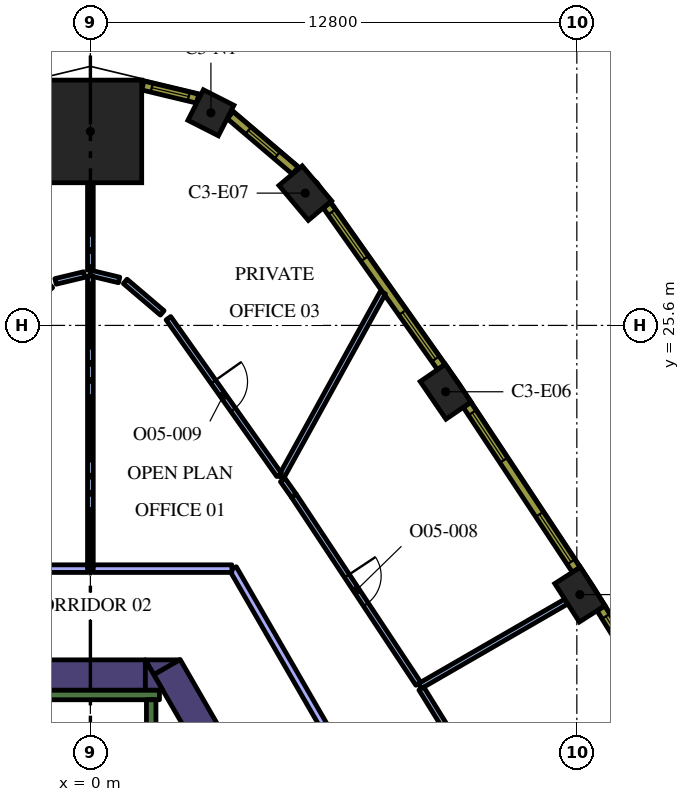
"""IFC4 building model, lengths in metres.
Left out: names, types, materials, properties, quantities, classifications, styles, units other than length and angle.
Written with IfcOpenShell. Run it as: python <this file> out.ifc"""

import sys

from ifc_helpers import new_model, si_unit, direction, frame, frame_2d, origin, origin_2d, place, context, subcontext, project, spatial, polyline, rectangle, outline, extrude, element, fill, save


model = new_model("IFC4")
c1 = context("Model", 3, precision=1e-05, world=origin(), true_north=direction((0.0, 1.0)))
c2 = subcontext(c1, "Body", "Model", "MODEL_VIEW")
j1 = project(units=[si_unit("LENGTHUNIT", "METRE"), si_unit("PLANEANGLEUNIT", "RADIAN")], contexts=[c1])
p1 = place(None, origin())
s1 = spatial("IfcSite", under=j1, at=p1, CompositionType="ELEMENT")
p2 = place(p1, origin())
s2 = spatial("IfcBuilding", under=s1, at=p2, CompositionType="ELEMENT")
p3 = place(p2, frame((0.0, 0.0, 192.0)))
s3 = spatial("IfcBuildingStorey", under=s2, at=p3, CompositionType="ELEMENT", Elevation=192.0)
p4 = place(p3, frame((0.0, 30.704, 0.0), z_axis=(0.0, 0.0, 1.0), x_axis=(0.0, 1.0, 0.0)))
e1 = element("IfcColumn", 1, at=p4, inside=s3, PredefinedType="COLUMN", context=c2, shape_type="SweptSolid", body=[
    extrude(rectangle(XDim=2.7, YDim=2.7, at=origin_2d()), origin(), (0.0, 0.0, 1.0), 4.2),
])
for number, where, z_axis, x_axis in (
    (2, (12.88, 18.517, 0.0), (0.0, 0.0, 1.0), (-0.539, 0.842, 0.0)),
    (3, (9.348, 23.854, 0.0), (0.0, 0.0, 1.0), (-0.565, 0.825, 0.0)),
    (4, (5.654, 29.081, 0.0), (0.0, 0.0, 1.0), (-0.644, 0.765, 0.0)),
):
    element("IfcColumn", number, at=place(p3, frame(where, z_axis=z_axis, x_axis=x_axis)), inside=s3, PredefinedType="COLUMN", context=c2, shape_type="SweptSolid", body=[
        extrude(rectangle(XDim=1.2, YDim=0.8, at=origin_2d()), origin(), (0.0, 0.0, 1.0), 4.2),
    ])
p5 = place(p3, frame((3.171, 31.195, 0.0), z_axis=(0.0, 0.0, 1.0), x_axis=(-0.891486197647, 0.453047855535, 0.0)))
e5 = element("IfcColumn", 5, at=p5, inside=s3, PredefinedType="COLUMN", context=c2, shape_type="SweptSolid", body=[
    extrude(rectangle(XDim=0.9, YDim=0.9, at=origin_2d()), origin(), (0.0, 0.0, 1.0), 4.2),
])
p6 = place(p3, frame((8.279, 5.761, 0.0), z_axis=(0.0, 0.0, 1.0), x_axis=(-0.500010359015, 0.866019422922, 0.0)))
e6 = element("IfcWall", 6, at=p6, inside=s3, PredefinedType="SOLIDWALL", context=c2, shape_type="SweptSolid", body=[
    extrude(rectangle(XDim=12.528, YDim=0.8, at=frame_2d((6.264, 0.0))), origin(), (0.0, 0.0, 1.0), 4.2),
])
p7 = place(p3, origin())
e7 = element("IfcWall", 7, at=p7, inside=s3, PredefinedType="SOLIDWALL", context=c2, shape_type="SweptSolid", body=[
    extrude(outline(polyline([(1.443, 16.8), (2.339, 16.8), (1.667, 16.412), (1.443, 16.8)])), origin(), (0.0, 0.0, 1.0), 4.2),
])
p8 = place(p3, frame((-2.379, 16.4, 0.0), z_axis=(0.0, 0.0, 1.0), x_axis=(1.0, 0.0, 0.0)))
e8 = element("IfcWall", 8, at=p8, inside=s3, PredefinedType="SOLIDWALL", context=c2, shape_type="SweptSolid", body=[
    extrude(rectangle(XDim=3.824, YDim=0.8, at=frame_2d((1.912, 0.0))), origin(), (0.0, 0.0, 1.0), 4.2),
])
e9 = element("IfcWall", 9, at=p7, inside=s3, PredefinedType="SOLIDWALL", context=c2, shape_type="SweptSolid", body=[
    extrude(outline(polyline([(1.905, 16.0), (1.447, 16.0), (1.447, 16.793), (1.905, 16.0)])), origin(), (0.0, 0.0, 1.0), 4.2),
])
p9 = place(p3, frame((-1.817, 15.875, 0.0), z_axis=(0.0, 0.0, 1.0), x_axis=(1.0, 0.0, 0.0)))
e10 = element("IfcWall", 10, at=p9, inside=s3, PredefinedType="SOLIDWALL", context=c2, shape_type="SweptSolid", body=[
    extrude(rectangle(XDim=3.634, YDim=0.25, at=frame_2d((1.817, 0.0))), origin(), (0.0, 0.0, 1.0), 4.2),
])
p10 = place(p3, frame((1.6, 8.95, 0.0), z_axis=(0.0, 0.0, 1.0), x_axis=(0.0, 1.0, 0.0)))
e11 = element("IfcWall", 11, at=p10, inside=s3, PredefinedType="SOLIDWALL", context=c2, shape_type="SweptSolid", body=[
    extrude(rectangle(XDim=6.8, YDim=0.25, at=frame_2d((3.4, 0.0))), origin(), (0.0, 0.0, 1.0), 4.2),
])
p11 = place(p3, frame((8.669, 16.11, 0.0), z_axis=(0.0, 0.0, 1.0), x_axis=(0.866019272134, 0.50001062018, 0.0)))
e12 = element("IfcWall", 12, at=p11, inside=s3, PredefinedType="PARTITIONING", context=c2, shape_type="SweptSolid", body=[
    extrude(rectangle(XDim=4.449, YDim=0.15, at=frame_2d((2.225, 0.0))), origin(), (0.0, 0.0, 1.0), 3.1),
])
p12 = place(p3, frame((8.708, 16.046, 0.0), z_axis=(0.0, 0.0, 1.0), x_axis=(0.527179193015, -0.849754140003, 0.0)))
e13 = element("IfcWall", 13, at=p12, inside=s3, PredefinedType="PARTITIONING", context=c2, shape_type="SweptSolid", body=[
    extrude(rectangle(XDim=6.42, YDim=0.15, at=frame_2d((3.21, 0.0))), origin(), (0.0, 0.0, 1.0), 3.1),
])
p13 = place(p12, frame((2.719, 0.0, 0.0)))
e14 = element("IfcOpeningElement", 14, at=p13, cuts=e13, PredefinedType="OPENING", context=c2, shape_type="SweptSolid", body=[
    extrude(rectangle(XDim=0.9, YDim=2.1, at=frame_2d((0.45, 1.05))), frame((0.0, 0.085, 0.0), z_axis=(0.0, -1.0, 0.0), x_axis=(1.0, 0.0, 0.0)), (0.0, 0.0, 1.0), 0.17),
])
p14 = place(p3, frame((5.014, 21.599, 0.0), z_axis=(0.0, 0.0, 1.0), x_axis=(0.483014624036, 0.875612284614, 0.0)))
e15 = element("IfcWall", 15, at=p14, inside=s3, PredefinedType="PARTITIONING", context=c2, shape_type="SweptSolid", body=[
    extrude(rectangle(XDim=5.557, YDim=0.15, at=frame_2d((2.778, 0.0))), origin(), (0.0, 0.0, 1.0), 3.1),
])
p15 = place(p3, frame((5.352, 21.121, 0.0), z_axis=(0.0, 0.0, 1.0), x_axis=(0.551896352686, -0.833912714792, 0.0)))
e16 = element("IfcWall", 16, at=p15, inside=s3, PredefinedType="PARTITIONING", context=c2, shape_type="SweptSolid", body=[
    extrude(rectangle(XDim=5.934, YDim=0.15, at=frame_2d((2.967, 0.0))), origin(), (0.0, 0.0, 1.0), 3.1),
])
p16 = place(p15, frame((2.534, 0.0, 0.0)))
e17 = element("IfcOpeningElement", 17, at=p16, cuts=e16, PredefinedType="OPENING", context=c2, shape_type="SweptSolid", body=[
    extrude(rectangle(XDim=0.9, YDim=2.1, at=frame_2d((0.45, 1.05))), frame((0.0, 0.085, 0.0), z_axis=(0.0, -1.0, 0.0), x_axis=(1.0, 0.0, 0.0)), (0.0, 0.0, 1.0), 0.17),
])
p17 = place(p3, frame((5.352, 21.121, 0.0), z_axis=(0.0, 0.0, 1.0), x_axis=(-0.57727495493, 0.816549830941, 0.0)))
e18 = element("IfcWall", 18, at=p17, inside=s3, PredefinedType="PARTITIONING", context=c2, shape_type="SweptSolid", body=[
    extrude(rectangle(XDim=0.502, YDim=0.15, at=frame_2d((0.251, 0.0))), origin(), (0.0, 0.0, 1.0), 3.1),
])
p18 = place(p3, frame((2.053, 25.79, 0.0), z_axis=(0.0, 0.0, 1.0), x_axis=(0.5770856814, -0.816683608458, 0.0)))
e19 = element("IfcWall", 19, at=p18, inside=s3, PredefinedType="PARTITIONING", context=c2, shape_type="SweptSolid", body=[
    extrude(rectangle(XDim=5.048, YDim=0.15, at=frame_2d((2.524, 0.0))), origin(), (0.0, 0.0, 1.0), 3.1),
])
p19 = place(p18, frame((2.048, 0.0, 0.0)))
e20 = element("IfcOpeningElement", 20, at=p19, cuts=e19, PredefinedType="OPENING", context=c2, shape_type="SweptSolid", body=[
    extrude(rectangle(XDim=0.9, YDim=2.1, at=frame_2d((0.45, 1.05))), frame((0.0, 0.085, 0.0), z_axis=(0.0, -1.0, 0.0), x_axis=(1.0, 0.0, 0.0)), (0.0, 0.0, 1.0), 0.17),
])
p20 = place(p3, frame((1.89, 25.929, 0.0), z_axis=(0.0, 0.0, 1.0), x_axis=(-0.761368905571, 0.648318895012, 0.0)))
e21 = element("IfcWall", 21, at=p20, inside=s3, PredefinedType="PARTITIONING", context=c2, shape_type="SweptSolid", body=[
    extrude(rectangle(XDim=1.279, YDim=0.15, at=frame_2d((0.639, 0.0))), origin(), (0.0, 0.0, 1.0), 3.1),
])
p21 = place(p3, frame((0.756, 26.796, 0.0), z_axis=(0.0, 0.0, 1.0), x_axis=(-0.972515505601, 0.232838122666, 0.0)))
e22 = element("IfcWall", 22, at=p21, inside=s3, PredefinedType="PARTITIONING", context=c2, shape_type="SweptSolid", body=[
    extrude(rectangle(XDim=0.777, YDim=0.15, at=frame_2d((0.388, 0.0))), origin(), (0.0, 0.0, 1.0), 3.1),
])
p22 = place(p3, frame((0.0, 27.054, 0.0), z_axis=(0.0, 0.0, 1.0), x_axis=(0.0, 1.0, 0.0)))
e23 = element("IfcWall", 23, at=p22, inside=s3, PredefinedType="PARTITIONING", context=c2, shape_type="SweptSolid", body=[
    extrude(rectangle(XDim=2.3, YDim=0.15, at=frame_2d((1.15, 0.0))), origin(), (0.0, 0.0, 1.0), 3.1),
])
p23 = place(p3, frame((0.0, 19.2, 0.0), z_axis=(0.0, 0.0, 1.0), x_axis=(0.0, 1.0, 0.0)))
e24 = element("IfcWall", 24, at=p23, inside=s3, PredefinedType="PARTITIONING", context=c2, shape_type="SweptSolid", body=[
    extrude(rectangle(XDim=7.7, YDim=0.15, at=frame_2d((3.85, 0.0))), origin(), (0.0, 0.0, 1.0), 3.1),
])
p24 = place(p3, frame((8.113, 11.647, 0.0), z_axis=(0.0, 0.0, 1.0), x_axis=(-0.500001933108, 0.866024287701, 0.0)))
e25 = element("IfcWall", 25, at=p24, inside=s3, PredefinedType="PARTITIONING", context=c2, shape_type="SweptSolid", body=[
    extrude(rectangle(XDim=8.721, YDim=0.2, at=frame_2d((4.361, 0.0))), origin(), (0.0, 0.0, 1.0), 3.1),
])
p25 = place(p3, frame((3.723, 19.2, 0.0), z_axis=(0.0, 0.0, 1.0), x_axis=(-1.0, 0.0, 0.0)))
e26 = element("IfcWall", 26, at=p25, inside=s3, PredefinedType="PARTITIONING", context=c2, shape_type="SweptSolid", body=[
    extrude(rectangle(XDim=3.648, YDim=0.2, at=frame_2d((1.824, 0.0))), origin(), (0.0, 0.0, 1.0), 3.1),
])
p26 = place(p3, frame((-0.161, 26.939, 0.0), z_axis=(0.0, 0.0, 1.0), x_axis=(-0.972515505601, -0.232838122666, 0.0)))
e27 = element("IfcWall", 27, at=p26, inside=s3, PredefinedType="PARTITIONING", context=c2, shape_type="SweptSolid", body=[
    extrude(rectangle(XDim=0.777, YDim=0.15, at=frame_2d((0.388, 0.0))), origin(), (0.0, 0.0, 1.0), 3.1),
])
p27 = place(p3, frame((-1.042, 26.65, 0.0), z_axis=(0.0, 0.0, 1.0), x_axis=(-0.761485303115, -0.648182175888, 0.0)))
e28 = element("IfcWall", 28, at=p27, inside=s3, PredefinedType="PARTITIONING", context=c2, shape_type="SweptSolid", body=[
    extrude(rectangle(XDim=1.327, YDim=0.15, at=frame_2d((0.664, 0.0))), origin(), (0.0, 0.0, 1.0), 3.1),
])
p28 = place(p3, frame((-0.075, 19.2, 0.0), z_axis=(0.0, 0.0, 1.0), x_axis=(-1.0, 0.0, 0.0)))
e29 = element("IfcWall", 29, at=p28, inside=s3, PredefinedType="PARTITIONING", context=c2, shape_type="SweptSolid", body=[
    extrude(rectangle(XDim=3.678, YDim=0.2, at=frame_2d((1.839, 0.0))), origin(), (0.0, 0.0, 1.0), 3.1),
])
p29 = place(p3, frame((16.171, 13.731, 0.0), z_axis=(0.0, 0.0, 1.0), x_axis=(-0.526197926587, 0.850362124072, 0.0)))
e30 = element("IfcWall", 30, at=p29, inside=s3, PredefinedType="SOLIDWALL", context=c2, shape_type="SweptSolid", body=[
    extrude(rectangle(XDim=5.203, YDim=0.24, at=frame_2d((2.602, 0.0))), origin(), (0.0, 0.0, 1.0), 3.9),
])
p30 = place(p29, frame((0.248, 0.0, 0.9)))
e31 = element("IfcOpeningElement", 31, at=p30, cuts=e30, PredefinedType="OPENING", context=c2, shape_type="SweptSolid", body=[
    extrude(rectangle(XDim=1.5, YDim=2.55, at=frame_2d((0.75, 1.275))), frame((0.0, 0.13, 0.0), z_axis=(0.0, -1.0, 0.0), x_axis=(1.0, 0.0, 0.0)), (0.0, 0.0, 1.0), 0.26),
])
p31 = place(p29, frame((3.455, 0.0, 0.9)))
e32 = element("IfcOpeningElement", 32, at=p31, cuts=e30, PredefinedType="OPENING", context=c2, shape_type="SweptSolid", body=[
    extrude(rectangle(XDim=1.5, YDim=2.55, at=frame_2d((0.75, 1.275))), frame((0.0, 0.13, 0.0), z_axis=(0.0, -1.0, 0.0), x_axis=(1.0, 0.0, 0.0)), (0.0, 0.0, 1.0), 0.26),
])
p32 = place(p3, frame((12.783, 19.171, 0.0), z_axis=(0.0, 0.0, 1.0), x_axis=(-0.551892811511, 0.833915058386, 0.0)))
e33 = element("IfcWall", 33, at=p32, inside=s3, PredefinedType="SOLIDWALL", context=c2, shape_type="SweptSolid", body=[
    extrude(rectangle(XDim=5.204, YDim=0.24, at=frame_2d((2.602, 0.0))), origin(), (0.0, 0.0, 1.0), 3.9),
])
p33 = place(p32, frame((0.248, 0.0, 0.9)))
e34 = element("IfcOpeningElement", 34, at=p33, cuts=e33, PredefinedType="OPENING", context=c2, shape_type="SweptSolid", body=[
    extrude(rectangle(XDim=1.5, YDim=2.55, at=frame_2d((0.75, 1.275))), frame((0.0, 0.13, 0.0), z_axis=(0.0, -1.0, 0.0), x_axis=(1.0, 0.0, 0.0)), (0.0, 0.0, 1.0), 0.26),
])
p34 = place(p32, frame((3.455, 0.0, 0.9)))
e35 = element("IfcOpeningElement", 35, at=p34, cuts=e33, PredefinedType="OPENING", context=c2, shape_type="SweptSolid", body=[
    extrude(rectangle(XDim=1.5, YDim=2.55, at=frame_2d((0.75, 1.275))), frame((0.0, 0.13, 0.0), z_axis=(0.0, -1.0, 0.0), x_axis=(1.0, 0.0, 0.0)), (0.0, 0.0, 1.0), 0.26),
])
p35 = place(p3, frame((9.231, 24.504, 0.0), z_axis=(0.0, 0.0, 1.0), x_axis=(-0.577115207679, 0.816662743772, 0.0)))
e36 = element("IfcWall", 36, at=p35, inside=s3, PredefinedType="SOLIDWALL", context=c2, shape_type="SweptSolid", body=[
    extrude(rectangle(XDim=5.213, YDim=0.24, at=frame_2d((2.606, 0.0))), origin(), (0.0, 0.0, 1.0), 3.9),
])
p36 = place(p35, frame((0.261, 0.0, 0.9)))
e37 = element("IfcOpeningElement", 37, at=p36, cuts=e36, PredefinedType="OPENING", context=c2, shape_type="SweptSolid", body=[
    extrude(rectangle(XDim=1.5, YDim=2.55, at=frame_2d((0.75, 1.275))), frame((0.0, 0.13, 0.0), z_axis=(0.0, -1.0, 0.0), x_axis=(1.0, 0.0, 0.0)), (0.0, 0.0, 1.0), 0.26),
])
p37 = place(p35, frame((3.492, 0.0, 0.9)))
e38 = element("IfcOpeningElement", 38, at=p37, cuts=e36, PredefinedType="OPENING", context=c2, shape_type="SweptSolid", body=[
    extrude(rectangle(XDim=1.5, YDim=2.55, at=frame_2d((0.75, 1.275))), frame((0.0, 0.13, 0.0), z_axis=(0.0, -1.0, 0.0), x_axis=(1.0, 0.0, 0.0)), (0.0, 0.0, 1.0), 0.26),
])
p38 = place(p3, frame((5.392, 29.672, 0.0), z_axis=(0.0, 0.0, 1.0), x_axis=(-0.761419744247, 0.648259186645, 0.0)))
e39 = element("IfcWall", 39, at=p38, inside=s3, PredefinedType="SOLIDWALL", context=c2, shape_type="SweptSolid", body=[
    extrude(rectangle(XDim=2.25, YDim=0.24, at=frame_2d((1.125, 0.0))), origin(), (0.0, 0.0, 1.0), 3.9),
])
p39 = place(p38, frame((0.625, 0.0, 0.9)))
e40 = element("IfcOpeningElement", 40, at=p39, cuts=e39, PredefinedType="OPENING", context=c2, shape_type="SweptSolid", body=[
    extrude(rectangle(XDim=1.0, YDim=2.55, at=frame_2d((0.5, 1.275))), frame((0.0, 0.13, 0.0), z_axis=(0.0, -1.0, 0.0), x_axis=(1.0, 0.0, 0.0)), (0.0, 0.0, 1.0), 0.26),
])
p40 = place(p3, frame((2.821, 31.566, 0.0), z_axis=(0.0, 0.0, 1.0), x_axis=(-0.972479955788, 0.232986556673, 0.0)))
e41 = element("IfcWall", 41, at=p40, inside=s3, PredefinedType="SOLIDWALL", context=c2, shape_type="SweptSolid", body=[
    extrude(rectangle(XDim=1.482, YDim=0.24, at=frame_2d((0.741, 0.0))), origin(), (0.0, 0.0, 1.0), 3.9),
])
p41 = place(p40, frame((0.241, 0.0, 0.9)))
e42 = element("IfcOpeningElement", 42, at=p41, cuts=e41, PredefinedType="OPENING", context=c2, shape_type="SweptSolid", body=[
    extrude(rectangle(XDim=1.0, YDim=2.55, at=frame_2d((0.5, 1.275))), frame((0.0, 0.13, 0.0), z_axis=(0.0, -1.0, 0.0), x_axis=(1.0, 0.0, 0.0)), (0.0, 0.0, 1.0), 0.26),
])
p42 = place(p16, origin())
e43 = element("IfcDoor", 43, at=p42, inside=s3, OperationType="SINGLE_SWING_RIGHT", PredefinedType="DOOR", context=c2, shape_type="SweptSolid", body=[
    extrude(rectangle(XDim=0.9, YDim=2.1, at=frame_2d((0.45, 1.05))), frame((0.0, 0.025, 0.0), z_axis=(0.0, -1.0, 0.0), x_axis=(1.0, 0.0, 0.0)), (0.0, 0.0, 1.0), 0.05),
])
fill(e17, e43)
p43 = place(p19, origin())
e44 = element("IfcDoor", 44, at=p43, inside=s3, OperationType="SINGLE_SWING_LEFT", PredefinedType="DOOR", context=c2, shape_type="SweptSolid", body=[
    extrude(rectangle(XDim=0.9, YDim=2.1, at=frame_2d((0.45, 1.05))), frame((0.0, 0.025, 0.0), z_axis=(0.0, -1.0, 0.0), x_axis=(1.0, 0.0, 0.0)), (0.0, 0.0, 1.0), 0.05),
])
fill(e20, e44)
p44 = place(p31, origin())
e45 = element("IfcWindow", 45, at=p44, inside=s3, PartitioningType="SINGLE_PANEL", PredefinedType="WINDOW", context=c2, shape_type="SweptSolid", body=[
    extrude(rectangle(XDim=1.5, YDim=2.55, at=frame_2d((0.75, 1.275))), frame((0.0, 0.04, 0.0), z_axis=(0.0, -1.0, 0.0), x_axis=(1.0, 0.0, 0.0)), (0.0, 0.0, 1.0), 0.06),
])
fill(e32, e45)
p45 = place(p33, origin())
e46 = element("IfcWindow", 46, at=p45, inside=s3, PartitioningType="SINGLE_PANEL", PredefinedType="WINDOW", context=c2, shape_type="SweptSolid", body=[
    extrude(rectangle(XDim=1.5, YDim=2.55, at=frame_2d((0.75, 1.275))), frame((0.0, 0.04, 0.0), z_axis=(0.0, -1.0, 0.0), x_axis=(1.0, 0.0, 0.0)), (0.0, 0.0, 1.0), 0.06),
])
fill(e34, e46)
p46 = place(p34, origin())
e47 = element("IfcWindow", 47, at=p46, inside=s3, PartitioningType="SINGLE_PANEL", PredefinedType="WINDOW", context=c2, shape_type="SweptSolid", body=[
    extrude(rectangle(XDim=1.5, YDim=2.55, at=frame_2d((0.75, 1.275))), frame((0.0, 0.04, 0.0), z_axis=(0.0, -1.0, 0.0), x_axis=(1.0, 0.0, 0.0)), (0.0, 0.0, 1.0), 0.06),
])
fill(e35, e47)
p47 = place(p36, origin())
e48 = element("IfcWindow", 48, at=p47, inside=s3, PartitioningType="SINGLE_PANEL", PredefinedType="WINDOW", context=c2, shape_type="SweptSolid", body=[
    extrude(rectangle(XDim=1.5, YDim=2.55, at=frame_2d((0.75, 1.275))), frame((0.0, 0.04, 0.0), z_axis=(0.0, -1.0, 0.0), x_axis=(1.0, 0.0, 0.0)), (0.0, 0.0, 1.0), 0.06),
])
fill(e37, e48)
p48 = place(p37, origin())
e49 = element("IfcWindow", 49, at=p48, inside=s3, PartitioningType="SINGLE_PANEL", PredefinedType="WINDOW", context=c2, shape_type="SweptSolid", body=[
    extrude(rectangle(XDim=1.5, YDim=2.55, at=frame_2d((0.75, 1.275))), frame((0.0, 0.04, 0.0), z_axis=(0.0, -1.0, 0.0), x_axis=(1.0, 0.0, 0.0)), (0.0, 0.0, 1.0), 0.06),
])
fill(e38, e49)
p49 = place(p39, origin())
e50 = element("IfcWindow", 50, at=p49, inside=s3, PartitioningType="SINGLE_PANEL", PredefinedType="WINDOW", context=c2, shape_type="SweptSolid", body=[
    extrude(rectangle(XDim=1.0, YDim=2.55, at=frame_2d((0.5, 1.275))), frame((0.0, 0.04, 0.0), z_axis=(0.0, -1.0, 0.0), x_axis=(1.0, 0.0, 0.0)), (0.0, 0.0, 1.0), 0.06),
])
fill(e40, e50)
p50 = place(p41, origin())
e51 = element("IfcWindow", 51, at=p50, inside=s3, PartitioningType="SINGLE_PANEL", PredefinedType="WINDOW", context=c2, shape_type="SweptSolid", body=[
    extrude(rectangle(XDim=1.0, YDim=2.55, at=frame_2d((0.5, 1.275))), frame((0.0, 0.04, 0.0), z_axis=(0.0, -1.0, 0.0), x_axis=(1.0, 0.0, 0.0)), (0.0, 0.0, 1.0), 0.06),
])
fill(e42, e51)
save(model, sys.argv[1])
